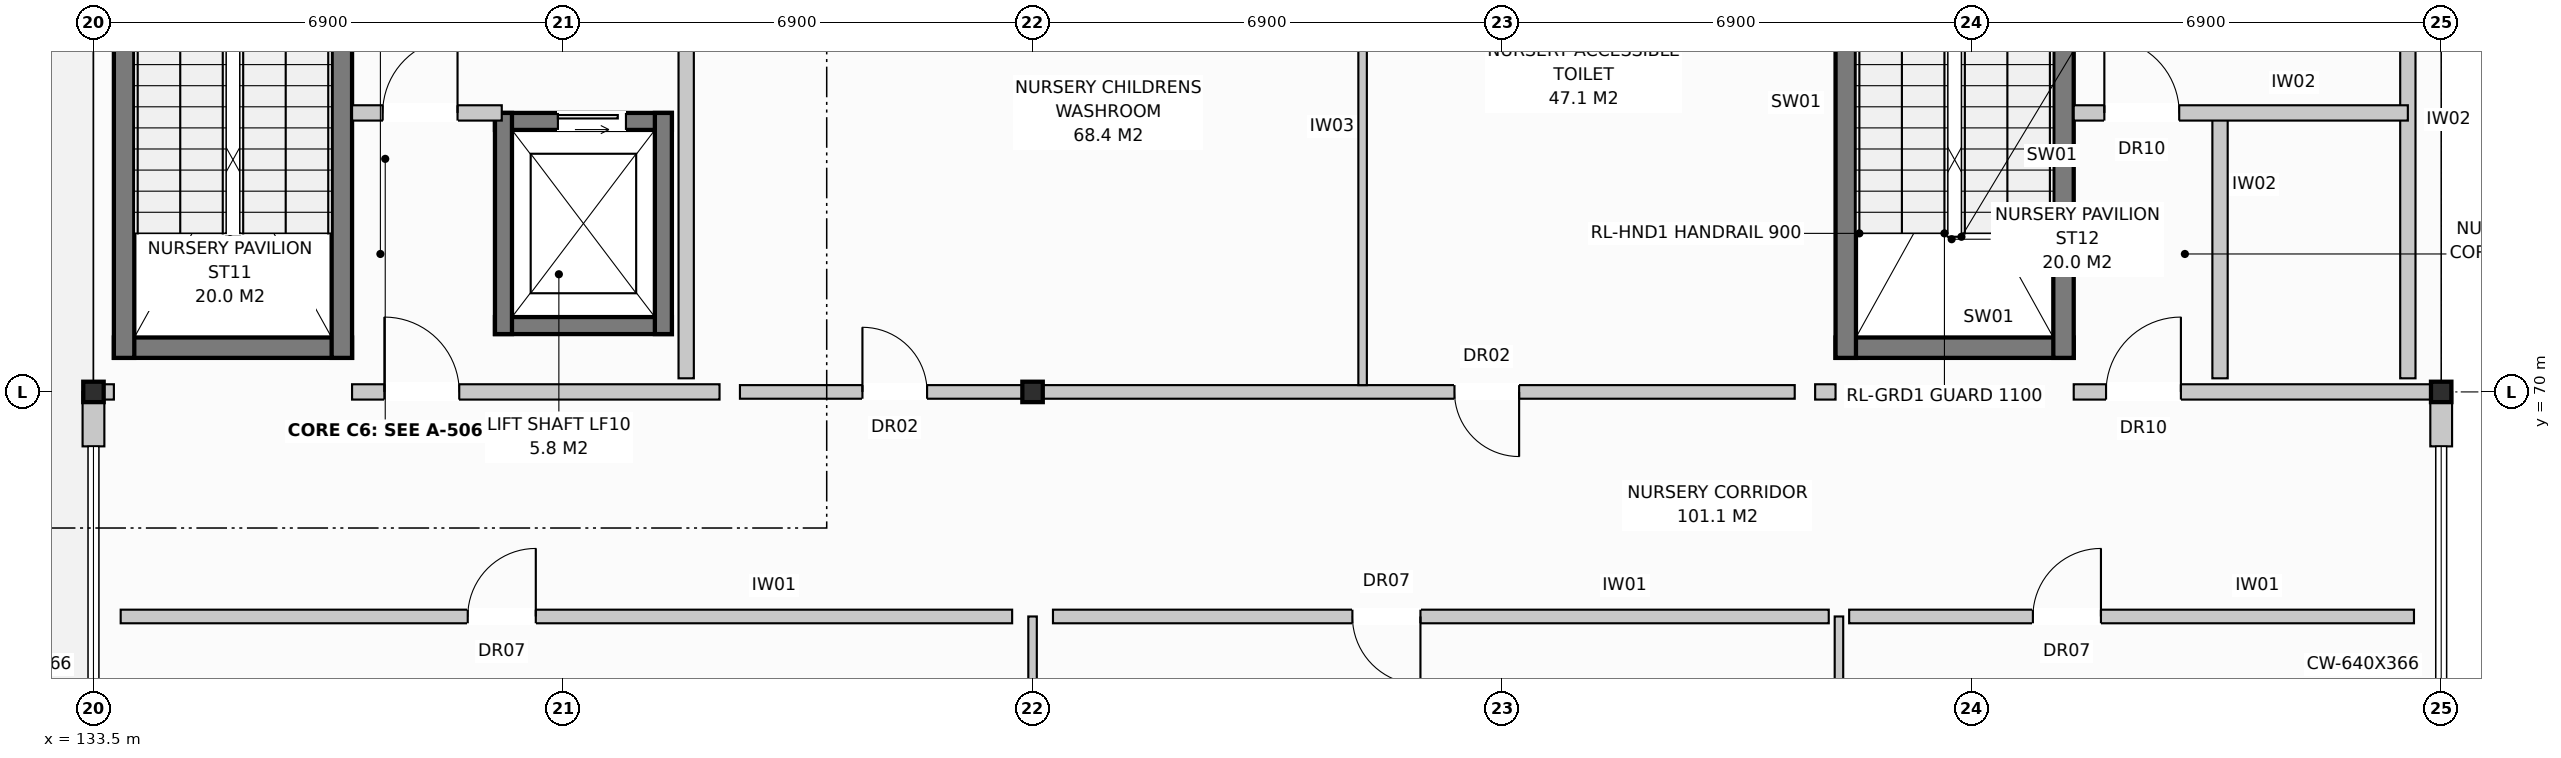
"""IFC4 building model, lengths in metres.
Left out: names, types, materials, properties, quantities, classifications, styles, units other than length and angle.
Written with IfcOpenShell. Run it as: python <this file> out.ifc"""

import sys

from ifc_helpers import new_model, si_unit, direction, frame, frame_2d, origin, origin_with_axes, origin_2d, place, context, subcontext, project, spatial, rectangle, i_section, extrude, element, fill, save


model = new_model("IFC4")
c1 = context("Model", 3, precision=1e-05, world=origin(), true_north=direction((0.0, 1.0)))
c2 = subcontext(c1, "Body", "Model", "MODEL_VIEW")
j1 = project(units=[si_unit("LENGTHUNIT", "METRE"), si_unit("PLANEANGLEUNIT", "RADIAN")], contexts=[c1])
p1 = place(None, origin())
s1 = spatial("IfcSite", under=j1, at=p1, CompositionType="ELEMENT")
p2 = place(p1, origin())
s2 = spatial("IfcBuilding", under=s1, at=p2, CompositionType="ELEMENT")
p3 = place(p2, origin())
s3 = spatial("IfcBuildingStorey", under=s2, at=p3, CompositionType="ELEMENT", Elevation=0.0)
for number, where, z_axis, x_axis in (
    (1, (133.5, 70.0, 0.0), (0.0, 0.0, 1.0), (1.0, 0.0, 0.0)),
    (2, (147.3, 70.0, 0.0), (0.0, 0.0, 1.0), (1.0, 0.0, 0.0)),
    (3, (168.0, 70.0, 0.0), (0.0, 0.0, 1.0), (1.0, 0.0, 0.0)),
):
    element("IfcColumn", number, at=place(p3, frame(where, z_axis=z_axis, x_axis=x_axis)), inside=s3, PredefinedType="COLUMN", context=c2, shape_type="SweptSolid", body=[
        extrude(i_section(OverallWidth=0.3, OverallDepth=0.3, WebThickness=0.011, FlangeThickness=0.019, at=origin_2d()), origin(), (0.0, 0.0, 1.0), 4.4),
    ])
for number, where, z_axis, x_axis in (
    (4, (133.5, 69.2, 0.0), (0.0, 0.0, 1.0), (0.0, 1.0, 0.0)),
    (5, (168.0, 69.2, 0.0), (0.0, 0.0, 1.0), (0.0, 1.0, 0.0)),
):
    element("IfcWall", number, at=place(p3, frame(where, z_axis=z_axis, x_axis=x_axis)), inside=s3, PredefinedType="STANDARD", context=c2, shape_type="SweptSolid", body=[
        extrude(rectangle(XDim=0.8, YDim=0.32, at=frame_2d((0.4, 0.0))), origin(), (0.0, 0.0, 1.0), 3.66),
    ])
p4 = place(p3, frame((133.8, 70.65, 0.0), z_axis=(0.0, 0.0, 1.0), x_axis=(1.0, 0.0, 0.0)))
e6 = element("IfcWall", 6, at=p4, inside=s3, PredefinedType="SHEAR", context=c2, shape_type="SweptSolid", body=[
    extrude(rectangle(XDim=3.5, YDim=0.3, at=frame_2d((1.75, 0.0))), origin(), (0.0, 0.0, 1.0), 4.12),
])
p5 = place(p3, frame((133.95, 70.5, 0.0), z_axis=(0.0, 0.0, 1.0), x_axis=(0.0, 1.0, 0.0)))
e7 = element("IfcWall", 7, at=p5, inside=s3, PredefinedType="SHEAR", context=c2, shape_type="SweptSolid", body=[
    extrude(rectangle(XDim=7.5, YDim=0.3, at=frame_2d((3.75, 0.0))), origin(), (0.0, 0.0, 1.0), 4.12),
])
p6 = place(p3, frame((137.15, 70.5, 0.0), z_axis=(0.0, 0.0, 1.0), x_axis=(0.0, 1.0, 0.0)))
e8 = element("IfcWall", 8, at=p6, inside=s3, PredefinedType="SHEAR", context=c2, shape_type="SweptSolid", body=[
    extrude(rectangle(XDim=7.5, YDim=0.3, at=frame_2d((3.75, 0.0))), origin(), (0.0, 0.0, 1.0), 4.12),
])
p7 = place(p6, frame((5.7, 0.0, 0.0)))
e9 = element("IfcOpeningElement", 9, at=p7, cuts=e8, PredefinedType="OPENING", context=c2, shape_type="SweptSolid", body=[
    extrude(rectangle(XDim=1.15, YDim=2.15, at=frame_2d((0.575, 1.075))), frame((0.0, 0.162, 0.0), z_axis=(0.0, -1.0, 0.0), x_axis=(1.0, 0.0, 0.0)), (0.0, 0.0, 1.0), 0.324),
])
p8 = place(p3, frame((139.4, 73.975, 0.0), z_axis=(0.0, 0.0, 1.0), x_axis=(1.0, 0.0, 0.0)))
e10 = element("IfcWall", 10, at=p8, inside=s3, PredefinedType="SHEAR", context=c2, shape_type="SweptSolid", body=[
    extrude(rectangle(XDim=2.6, YDim=0.25, at=frame_2d((1.3, 0.0))), origin(), (0.0, 0.0, 1.0), 4.12),
])
p9 = place(p8, frame((0.925, 0.0, 0.0)))
e11 = element("IfcOpeningElement", 11, at=p9, cuts=e10, PredefinedType="OPENING", context=c2, shape_type="SweptSolid", body=[
    extrude(rectangle(XDim=1.0, YDim=2.1, at=frame_2d((0.5, 1.05))), frame((0.0, 0.137, 0.0), z_axis=(0.0, -1.0, 0.0), x_axis=(1.0, 0.0, 0.0)), (0.0, 0.0, 1.0), 0.274),
])
p10 = place(p3, frame((139.4, 70.975, 0.0), z_axis=(0.0, 0.0, 1.0), x_axis=(1.0, 0.0, 0.0)))
e12 = element("IfcWall", 12, at=p10, inside=s3, PredefinedType="SHEAR", context=c2, shape_type="SweptSolid", body=[
    extrude(rectangle(XDim=2.6, YDim=0.25, at=frame_2d((1.3, 0.0))), origin(), (0.0, 0.0, 1.0), 4.12),
])
for number, where, z_axis, x_axis in (
    (13, (139.525, 70.85, 0.0), (0.0, 0.0, 1.0), (0.0, 1.0, 0.0)),
    (14, (141.875, 70.85, 0.0), (0.0, 0.0, 1.0), (0.0, 1.0, 0.0)),
):
    element("IfcWall", number, at=place(p3, frame(where, z_axis=z_axis, x_axis=x_axis)), inside=s3, PredefinedType="SHEAR", context=c2, shape_type="SweptSolid", body=[
        extrude(rectangle(XDim=3.25, YDim=0.25, at=frame_2d((1.625, 0.0))), origin(), (0.0, 0.0, 1.0), 4.12),
    ])
p11 = place(p3, frame((142.21, 70.2, 0.0), z_axis=(0.0, 0.0, 1.0), x_axis=(0.0, 1.0, 0.0)))
e15 = element("IfcWall", 15, at=p11, inside=s3, PredefinedType="PARTITIONING", context=c2, shape_type="SweptSolid", body=[
    extrude(rectangle(XDim=7.6, YDim=0.225, at=frame_2d((3.8, 0.0))), origin(), (0.0, 0.0, 1.0), 4.12),
])
p12 = place(p3, frame((137.3, 74.1, 0.0), z_axis=(0.0, 0.0, 1.0), x_axis=(1.0, 0.0, 0.0)))
e16 = element("IfcWall", 16, at=p12, inside=s3, PredefinedType="PARTITIONING", context=c2, shape_type="SweptSolid", body=[
    extrude(rectangle(XDim=2.2, YDim=0.225, at=frame_2d((1.1, 0.0))), origin(), (0.0, 0.0, 1.0), 4.12),
])
p13 = place(p12, frame((0.45, 0.0, 0.0)))
e17 = element("IfcOpeningElement", 17, at=p13, cuts=e16, PredefinedType="OPENING", context=c2, shape_type="SweptSolid", body=[
    extrude(rectangle(XDim=1.1, YDim=2.15, at=frame_2d((0.55, 1.075))), frame((0.0, 0.125, 0.0), z_axis=(0.0, -1.0, 0.0), x_axis=(1.0, 0.0, 0.0)), (0.0, 0.0, 1.0), 0.249),
])
p14 = place(p3, frame((133.65, 70.0, 0.0), z_axis=(0.0, 0.0, 1.0), x_axis=(1.0, 0.0, 0.0)))
e18 = element("IfcWall", 18, at=p14, inside=s3, PredefinedType="PARTITIONING", context=c2, shape_type="SweptSolid", body=[
    extrude(rectangle(XDim=0.15, YDim=0.225, at=frame_2d((0.075, 0.0))), origin(), (0.0, 0.0, 1.0), 4.12),
])
p15 = place(p3, frame((137.3, 70.0, 0.0), z_axis=(0.0, 0.0, 1.0), x_axis=(1.0, 0.0, 0.0)))
e19 = element("IfcWall", 19, at=p15, inside=s3, PredefinedType="PARTITIONING", context=c2, shape_type="SweptSolid", body=[
    extrude(rectangle(XDim=5.4, YDim=0.225, at=frame_2d((2.7, 0.0))), origin(), (0.0, 0.0, 1.0), 3.67),
])
p16 = place(p15, frame((0.475, 0.0, 0.0)))
e20 = element("IfcOpeningElement", 20, at=p16, cuts=e19, PredefinedType="OPENING", context=c2, shape_type="SweptSolid", body=[
    extrude(rectangle(XDim=1.1, YDim=2.15, at=frame_2d((0.55, 1.075))), frame((0.0, 0.125, 0.0), z_axis=(0.0, -1.0, 0.0), x_axis=(1.0, 0.0, 0.0)), (0.0, 0.0, 1.0), 0.249),
])
p17 = place(p3, frame((159.1, 70.65, 0.0), z_axis=(0.0, 0.0, 1.0), x_axis=(1.0, 0.0, 0.0)))
e21 = element("IfcWall", 21, at=p17, inside=s3, PredefinedType="SHEAR", context=c2, shape_type="SweptSolid", body=[
    extrude(rectangle(XDim=3.5, YDim=0.3, at=frame_2d((1.75, 0.0))), origin(), (0.0, 0.0, 1.0), 4.12),
])
p18 = place(p3, frame((159.25, 70.5, 0.0), z_axis=(0.0, 0.0, 1.0), x_axis=(0.0, 1.0, 0.0)))
e22 = element("IfcWall", 22, at=p18, inside=s3, PredefinedType="SHEAR", context=c2, shape_type="SweptSolid", body=[
    extrude(rectangle(XDim=7.5, YDim=0.3, at=frame_2d((3.75, 0.0))), origin(), (0.0, 0.0, 1.0), 4.12),
])
p19 = place(p3, frame((162.45, 70.5, 0.0), z_axis=(0.0, 0.0, 1.0), x_axis=(0.0, 1.0, 0.0)))
e23 = element("IfcWall", 23, at=p19, inside=s3, PredefinedType="SHEAR", context=c2, shape_type="SweptSolid", body=[
    extrude(rectangle(XDim=7.5, YDim=0.3, at=frame_2d((3.75, 0.0))), origin(), (0.0, 0.0, 1.0), 4.12),
])
p20 = place(p19, frame((5.7, 0.0, 0.0)))
e24 = element("IfcOpeningElement", 24, at=p20, cuts=e23, PredefinedType="OPENING", context=c2, shape_type="SweptSolid", body=[
    extrude(rectangle(XDim=1.15, YDim=2.15, at=frame_2d((0.575, 1.075))), frame((0.0, 0.162, 0.0), z_axis=(0.0, -1.0, 0.0), x_axis=(1.0, 0.0, 0.0)), (0.0, 0.0, 1.0), 0.324),
])
p21 = place(p3, frame((167.51, 70.2, 0.0), z_axis=(0.0, 0.0, 1.0), x_axis=(0.0, 1.0, 0.0)))
e25 = element("IfcWall", 25, at=p21, inside=s3, PredefinedType="PARTITIONING", context=c2, shape_type="SweptSolid", body=[
    extrude(rectangle(XDim=7.6, YDim=0.225, at=frame_2d((3.8, 0.0))), origin(), (0.0, 0.0, 1.0), 4.12),
])
p22 = place(p3, frame((164.75, 70.2, 0.0), z_axis=(0.0, 0.0, 1.0), x_axis=(0.0, 1.0, 0.0)))
e26 = element("IfcWall", 26, at=p22, inside=s3, PredefinedType="PARTITIONING", context=c2, shape_type="SweptSolid", body=[
    extrude(rectangle(XDim=3.8, YDim=0.225, at=frame_2d((1.9, 0.0))), origin(), (0.0, 0.0, 1.0), 4.12),
])
p23 = place(p3, frame((162.6, 74.1, 0.0), z_axis=(0.0, 0.0, 1.0), x_axis=(1.0, 0.0, 0.0)))
e27 = element("IfcWall", 27, at=p23, inside=s3, PredefinedType="PARTITIONING", context=c2, shape_type="SweptSolid", body=[
    extrude(rectangle(XDim=4.91, YDim=0.225, at=frame_2d((2.455, 0.0))), origin(), (0.0, 0.0, 1.0), 4.12),
])
p24 = place(p23, frame((0.45, 0.0, 0.0)))
e28 = element("IfcOpeningElement", 28, at=p24, cuts=e27, PredefinedType="OPENING", context=c2, shape_type="SweptSolid", body=[
    extrude(rectangle(XDim=1.1, YDim=2.15, at=frame_2d((0.55, 1.075))), frame((0.0, 0.125, 0.0), z_axis=(0.0, -1.0, 0.0), x_axis=(1.0, 0.0, 0.0)), (0.0, 0.0, 1.0), 0.249),
])
p25 = place(p3, frame((158.8, 70.0, 0.0), z_axis=(0.0, 0.0, 1.0), x_axis=(1.0, 0.0, 0.0)))
e29 = element("IfcWall", 29, at=p25, inside=s3, PredefinedType="PARTITIONING", context=c2, shape_type="SweptSolid", body=[
    extrude(rectangle(XDim=0.3, YDim=0.225, at=frame_2d((0.15, 0.0))), origin(), (0.0, 0.0, 1.0), 4.12),
])
p26 = place(p3, frame((162.6, 70.0, 0.0), z_axis=(0.0, 0.0, 1.0), x_axis=(1.0, 0.0, 0.0)))
e30 = element("IfcWall", 30, at=p26, inside=s3, PredefinedType="PARTITIONING", context=c2, shape_type="SweptSolid", body=[
    extrude(rectangle(XDim=5.25, YDim=0.225, at=frame_2d((2.625, 0.0))), origin(), (0.0, 0.0, 1.0), 3.57),
])
p27 = place(p26, frame((0.475, 0.0, 0.0)))
e31 = element("IfcOpeningElement", 31, at=p27, cuts=e30, PredefinedType="OPENING", context=c2, shape_type="SweptSolid", body=[
    extrude(rectangle(XDim=1.1, YDim=2.15, at=frame_2d((0.55, 1.075))), frame((0.0, 0.125, 0.0), z_axis=(0.0, -1.0, 0.0), x_axis=(1.0, 0.0, 0.0)), (0.0, 0.0, 1.0), 0.249),
])
p28 = place(p3, frame((133.9, 66.7, 0.0), z_axis=(0.0, 0.0, 1.0), x_axis=(1.0, 0.0, 0.0)))
e32 = element("IfcWall", 32, at=p28, inside=s3, PredefinedType="PARTITIONING", context=c2, shape_type="SweptSolid", body=[
    extrude(rectangle(XDim=13.1, YDim=0.2, at=frame_2d((6.55, 0.0))), origin(), (0.0, 0.0, 1.0), 4.12),
])
p29 = place(p28, frame((5.1, 0.0, 0.0)))
e33 = element("IfcOpeningElement", 33, at=p29, cuts=e32, PredefinedType="OPENING", context=c2, shape_type="SweptSolid", body=[
    extrude(rectangle(XDim=1.0, YDim=2.15, at=frame_2d((0.5, 1.075))), frame((0.0, 0.112, 0.0), z_axis=(0.0, -1.0, 0.0), x_axis=(1.0, 0.0, 0.0)), (0.0, 0.0, 1.0), 0.224),
])
p30 = place(p3, frame((147.6, 66.7, 0.0), z_axis=(0.0, 0.0, 1.0), x_axis=(1.0, 0.0, 0.0)))
e34 = element("IfcWall", 34, at=p30, inside=s3, PredefinedType="PARTITIONING", context=c2, shape_type="SweptSolid", body=[
    extrude(rectangle(XDim=11.4, YDim=0.2, at=frame_2d((5.7, 0.0))), origin(), (0.0, 0.0, 1.0), 4.12),
])
p31 = place(p30, frame((4.4, 0.0, 0.0)))
e35 = element("IfcOpeningElement", 35, at=p31, cuts=e34, PredefinedType="OPENING", context=c2, shape_type="SweptSolid", body=[
    extrude(rectangle(XDim=1.0, YDim=2.15, at=frame_2d((0.5, 1.075))), frame((0.0, 0.112, 0.0), z_axis=(0.0, -1.0, 0.0), x_axis=(1.0, 0.0, 0.0)), (0.0, 0.0, 1.0), 0.224),
])
p32 = place(p3, frame((159.3, 66.7, 0.0), z_axis=(0.0, 0.0, 1.0), x_axis=(1.0, 0.0, 0.0)))
e36 = element("IfcWall", 36, at=p32, inside=s3, PredefinedType="PARTITIONING", context=c2, shape_type="SweptSolid", body=[
    extrude(rectangle(XDim=8.3, YDim=0.2, at=frame_2d((4.15, 0.0))), origin(), (0.0, 0.0, 1.0), 4.12),
])
p33 = place(p32, frame((2.7, 0.0, 0.0)))
e37 = element("IfcOpeningElement", 37, at=p33, cuts=e36, PredefinedType="OPENING", context=c2, shape_type="SweptSolid", body=[
    extrude(rectangle(XDim=1.0, YDim=2.15, at=frame_2d((0.5, 1.075))), frame((0.0, 0.112, 0.0), z_axis=(0.0, -1.0, 0.0), x_axis=(1.0, 0.0, 0.0)), (0.0, 0.0, 1.0), 0.224),
])
p34 = place(p3, frame((147.3, 54.1, 0.0), z_axis=(0.0, 0.0, 1.0), x_axis=(0.0, 1.0, 0.0)))
e38 = element("IfcWall", 38, at=p34, inside=s3, PredefinedType="PARTITIONING", context=c2, shape_type="SweptSolid", body=[
    extrude(rectangle(XDim=12.6, YDim=0.125, at=frame_2d((6.3, 0.0))), origin(), (0.0, 0.0, 1.0), 3.66),
])
p35 = place(p3, frame((159.15, 54.1, 0.0), z_axis=(0.0, 0.0, 1.0), x_axis=(0.0, 1.0, 0.0)))
e39 = element("IfcWall", 39, at=p35, inside=s3, PredefinedType="PARTITIONING", context=c2, shape_type="SweptSolid", body=[
    extrude(rectangle(XDim=12.6, YDim=0.125, at=frame_2d((6.3, 0.0))), origin(), (0.0, 0.0, 1.0), 4.12),
])
p36 = place(p3, frame((143.0, 70.0, 0.0), z_axis=(0.0, 0.0, 1.0), x_axis=(1.0, 0.0, 0.0)))
e40 = element("IfcWall", 40, at=p36, inside=s3, PredefinedType="PARTITIONING", context=c2, shape_type="SweptSolid", body=[
    extrude(rectangle(XDim=15.5, YDim=0.2, at=frame_2d((7.75, 0.0))), origin(), (0.0, 0.0, 1.0), 3.57),
])
p37 = place(p36, frame((1.8, 0.0, 0.0)))
e41 = element("IfcOpeningElement", 41, at=p37, cuts=e40, PredefinedType="OPENING", context=c2, shape_type="SweptSolid", body=[
    extrude(rectangle(XDim=0.95, YDim=2.15, at=frame_2d((0.475, 1.075))), frame((0.0, 0.112, 0.0), z_axis=(0.0, -1.0, 0.0), x_axis=(1.0, 0.0, 0.0)), (0.0, 0.0, 1.0), 0.224),
])
p38 = place(p36, frame((10.5, 0.0, 0.0)))
e42 = element("IfcOpeningElement", 42, at=p38, cuts=e40, PredefinedType="OPENING", context=c2, shape_type="SweptSolid", body=[
    extrude(rectangle(XDim=0.95, YDim=2.15, at=frame_2d((0.475, 1.075))), frame((0.0, 0.112, 0.0), z_axis=(0.0, -1.0, 0.0), x_axis=(1.0, 0.0, 0.0)), (0.0, 0.0, 1.0), 0.224),
])
p39 = place(p3, frame((152.15, 70.1, 0.0), z_axis=(0.0, 0.0, 1.0), x_axis=(0.0, 1.0, 0.0)))
e43 = element("IfcWall", 43, at=p39, inside=s3, PredefinedType="PARTITIONING", context=c2, shape_type="SweptSolid", body=[
    extrude(rectangle(XDim=7.6, YDim=0.125, at=frame_2d((3.8, 0.0))), origin(), (0.0, 0.0, 1.0), 4.12),
])
p40 = place(p9, origin_with_axes())
e44 = element("IfcDoor", 44, at=p40, inside=s3, OperationType="SLIDING_TO_LEFT", PredefinedType="DOOR", context=c2, shape_type="SweptSolid", body=[
    extrude(rectangle(XDim=1.0, YDim=2.1, at=frame_2d((0.5, 1.05))), frame((0.0, 0.025, 0.0), z_axis=(0.0, -1.0, 0.0), x_axis=(1.0, 0.0, 0.0)), (0.0, 0.0, 1.0), 0.05),
])
fill(e11, e44)
p41 = place(p13, origin_with_axes())
e45 = element("IfcDoor", 45, at=p41, inside=s3, OperationType="SINGLE_SWING_RIGHT", PredefinedType="DOOR", context=c2, shape_type="SweptSolid", body=[
    extrude(rectangle(XDim=1.1, YDim=2.15, at=frame_2d((0.55, 1.075))), frame((0.0, 0.025, 0.0), z_axis=(0.0, -1.0, 0.0), x_axis=(1.0, 0.0, 0.0)), (0.0, 0.0, 1.0), 0.05),
])
fill(e17, e45)
p42 = place(p16, origin_with_axes())
e46 = element("IfcDoor", 46, at=p42, inside=s3, OperationType="SINGLE_SWING_LEFT", PredefinedType="DOOR", context=c2, shape_type="SweptSolid", body=[
    extrude(rectangle(XDim=1.1, YDim=2.15, at=frame_2d((0.55, 1.075))), frame((0.0, 0.025, 0.0), z_axis=(0.0, -1.0, 0.0), x_axis=(1.0, 0.0, 0.0)), (0.0, 0.0, 1.0), 0.05),
])
fill(e20, e46)
p43 = place(p24, origin_with_axes())
e47 = element("IfcDoor", 47, at=p43, inside=s3, OperationType="SINGLE_SWING_LEFT", PredefinedType="DOOR", context=c2, shape_type="SweptSolid", body=[
    extrude(rectangle(XDim=1.1, YDim=2.15, at=frame_2d((0.55, 1.075))), frame((0.0, 0.025, 0.0), z_axis=(0.0, -1.0, 0.0), x_axis=(1.0, 0.0, 0.0)), (0.0, 0.0, 1.0), 0.05),
])
fill(e28, e47)
p44 = place(p27, origin_with_axes())
e48 = element("IfcDoor", 48, at=p44, inside=s3, OperationType="SINGLE_SWING_RIGHT", PredefinedType="DOOR", context=c2, shape_type="SweptSolid", body=[
    extrude(rectangle(XDim=1.1, YDim=2.15, at=frame_2d((0.55, 1.075))), frame((0.0, 0.025, 0.0), z_axis=(0.0, -1.0, 0.0), x_axis=(1.0, 0.0, 0.0)), (0.0, 0.0, 1.0), 0.05),
])
fill(e31, e48)
p45 = place(p29, origin_with_axes())
e49 = element("IfcDoor", 49, at=p45, inside=s3, OperationType="SINGLE_SWING_RIGHT", PredefinedType="DOOR", context=c2, shape_type="SweptSolid", body=[
    extrude(rectangle(XDim=1.0, YDim=2.15, at=frame_2d((0.5, 1.075))), frame((0.0, 0.025, 0.0), z_axis=(0.0, -1.0, 0.0), x_axis=(1.0, 0.0, 0.0)), (0.0, 0.0, 1.0), 0.05),
])
fill(e33, e49)
p46 = place(p31, frame((1.0, 0.0, 0.0), z_axis=(0.0, 0.0, 1.0), x_axis=(-1.0, 0.0, 0.0)))
e50 = element("IfcDoor", 50, at=p46, inside=s3, OperationType="SINGLE_SWING_RIGHT", PredefinedType="DOOR", context=c2, shape_type="SweptSolid", body=[
    extrude(rectangle(XDim=1.0, YDim=2.15, at=frame_2d((0.5, 1.075))), frame((0.0, 0.025, 0.0), z_axis=(0.0, -1.0, 0.0), x_axis=(1.0, 0.0, 0.0)), (0.0, 0.0, 1.0), 0.05),
])
fill(e35, e50)
p47 = place(p33, origin_with_axes())
e51 = element("IfcDoor", 51, at=p47, inside=s3, OperationType="SINGLE_SWING_RIGHT", PredefinedType="DOOR", context=c2, shape_type="SweptSolid", body=[
    extrude(rectangle(XDim=1.0, YDim=2.15, at=frame_2d((0.5, 1.075))), frame((0.0, 0.025, 0.0), z_axis=(0.0, -1.0, 0.0), x_axis=(1.0, 0.0, 0.0)), (0.0, 0.0, 1.0), 0.05),
])
fill(e37, e51)
p48 = place(p37, origin_with_axes())
e52 = element("IfcDoor", 52, at=p48, inside=s3, OperationType="SINGLE_SWING_LEFT", PredefinedType="DOOR", context=c2, shape_type="SweptSolid", body=[
    extrude(rectangle(XDim=0.95, YDim=2.15, at=frame_2d((0.475, 1.075))), frame((0.0, 0.025, 0.0), z_axis=(0.0, -1.0, 0.0), x_axis=(1.0, 0.0, 0.0)), (0.0, 0.0, 1.0), 0.05),
])
fill(e41, e52)
p49 = place(p38, frame((0.95, 0.0, 0.0), z_axis=(0.0, 0.0, 1.0), x_axis=(-1.0, 0.0, 0.0)))
e53 = element("IfcDoor", 53, at=p49, inside=s3, OperationType="SINGLE_SWING_RIGHT", PredefinedType="DOOR", context=c2, shape_type="SweptSolid", body=[
    extrude(rectangle(XDim=0.95, YDim=2.15, at=frame_2d((0.475, 1.075))), frame((0.0, 0.025, 0.0), z_axis=(0.0, -1.0, 0.0), x_axis=(1.0, 0.0, 0.0)), (0.0, 0.0, 1.0), 0.05),
])
fill(e42, e53)
save(model, sys.argv[1])
